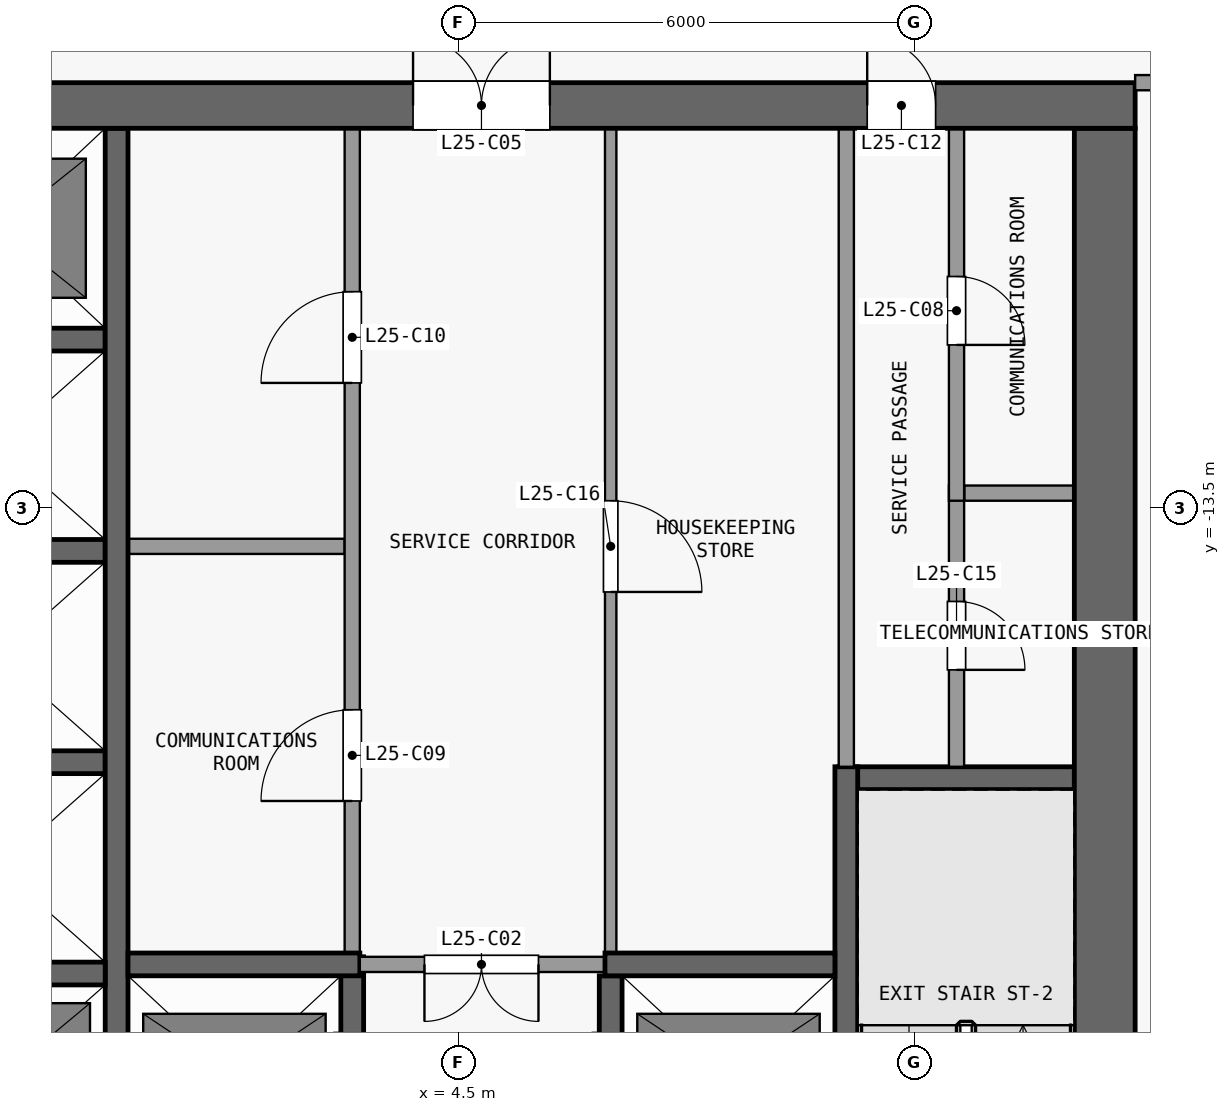
"""IFC4 building model, lengths in metres.
Left out: names, types, materials, properties, quantities, classifications, styles, units other than length and angle.
Written with IfcOpenShell. Run it as: python <this file> out.ifc"""

import sys

from ifc_helpers import new_model, si_unit, direction, frame, frame_2d, origin, place, context, subcontext, project, spatial, rectangle, extrude, element, fill, save


model = new_model("IFC4")
c1 = context("Model", 3, precision=1e-05, world=origin(), true_north=direction((0.0, 1.0)))
c2 = subcontext(c1, "Body", "Model", "MODEL_VIEW")
j1 = project(units=[si_unit("LENGTHUNIT", "METRE"), si_unit("PLANEANGLEUNIT", "RADIAN")], contexts=[c1])
p1 = place(None, origin())
s1 = spatial("IfcSite", under=j1, at=p1, CompositionType="ELEMENT")
p2 = place(p1, origin())
s2 = spatial("IfcBuilding", under=s1, at=p2, CompositionType="ELEMENT")
p3 = place(p2, frame((0.0, 0.0, 102.7)))
s3 = spatial("IfcBuildingStorey", under=s2, at=p3, CompositionType="ELEMENT", Elevation=102.7)
p4 = place(p3, frame((-13.4, -8.2, 0.0), z_axis=(0.0, 0.0, 1.0), x_axis=(1.0, 0.0, 0.0)))
e1 = element("IfcWall", 1, at=p4, inside=s3, PredefinedType="SHEAR", context=c2, shape_type="SweptSolid", body=[
    extrude(rectangle(XDim=26.8, YDim=0.6, at=frame_2d((13.4, 0.0))), origin(), (0.0, 0.0, 1.0), 3.3),
])
p5 = place(p4, frame((7.7, 0.0, 0.0)))
e2 = element("IfcOpeningElement", 2, at=p5, cuts=e1, PredefinedType="OPENING", context=c2, shape_type="SweptSolid", body=[
    extrude(rectangle(XDim=1.8, YDim=2.1, at=frame_2d((0.9, 1.05))), frame((0.0, 0.31, 0.0), z_axis=(0.0, -1.0, 0.0), x_axis=(1.0, 0.0, 0.0)), (0.0, 0.0, 1.0), 0.62),
])
p6 = place(p4, frame((17.3, 0.0, 0.0)))
e3 = element("IfcOpeningElement", 3, at=p6, cuts=e1, PredefinedType="OPENING", context=c2, shape_type="SweptSolid", body=[
    extrude(rectangle(XDim=1.8, YDim=2.1, at=frame_2d((0.9, 1.05))), frame((0.0, 0.31, 0.0), z_axis=(0.0, -1.0, 0.0), x_axis=(1.0, 0.0, 0.0)), (0.0, 0.0, 1.0), 0.62),
])
p7 = place(p4, frame((2.625, 0.0, 0.0)))
e4 = element("IfcOpeningElement", 4, at=p7, cuts=e1, PredefinedType="OPENING", context=c2, shape_type="SweptSolid", body=[
    extrude(rectangle(XDim=0.9, YDim=2.1, at=frame_2d((0.45, 1.05))), frame((0.0, 0.31, 0.0), z_axis=(0.0, -1.0, 0.0), x_axis=(1.0, 0.0, 0.0)), (0.0, 0.0, 1.0), 0.62),
])
p8 = place(p4, frame((23.275, 0.0, 0.0)))
e5 = element("IfcOpeningElement", 5, at=p8, cuts=e1, PredefinedType="OPENING", context=c2, shape_type="SweptSolid", body=[
    extrude(rectangle(XDim=0.9, YDim=2.1, at=frame_2d((0.45, 1.05))), frame((0.0, 0.31, 0.0), z_axis=(0.0, -1.0, 0.0), x_axis=(1.0, 0.0, 0.0)), (0.0, 0.0, 1.0), 0.62),
])
p9 = place(p3, frame((13.0, -24.6, 0.0), z_axis=(0.0, 0.0, 1.0), x_axis=(0.0, 1.0, 0.0)))
e6 = element("IfcWall", 6, at=p9, inside=s3, PredefinedType="SHEAR", context=c2, shape_type="SweptSolid", body=[
    extrude(rectangle(XDim=16.1, YDim=0.8, at=frame_2d((8.05, 0.0))), origin(), (0.0, 0.0, 1.0), 3.3),
])
p10 = place(p3, frame((-2.95, -19.62, 0.0), z_axis=(0.0, 0.0, 1.0), x_axis=(1.0, 0.0, 0.0)))
e7 = element("IfcWall", 7, at=p10, inside=s3, PredefinedType="SHEAR", context=c2, shape_type="SweptSolid", body=[
    extrude(rectangle(XDim=2.8, YDim=0.3, at=frame_2d((1.4, 0.0))), origin(), (0.0, 0.0, 1.0), 3.3),
])
p11 = place(p3, frame((0.15, -19.5, 0.0), z_axis=(0.0, 0.0, 1.0), x_axis=(1.0, 0.0, 0.0)))
e8 = element("IfcWall", 8, at=p11, inside=s3, PredefinedType="SHEAR", context=c2, shape_type="SweptSolid", body=[
    extrude(rectangle(XDim=3.05, YDim=0.3, at=frame_2d((1.525, 0.0))), origin(), (0.0, 0.0, 1.0), 3.3),
])
p12 = place(p3, frame((6.575, -19.5, 0.0), z_axis=(0.0, 0.0, 1.0), x_axis=(-1.0, 0.0, 0.0)))
e9 = element("IfcWall", 9, at=p12, inside=s3, PredefinedType="PARTITIONING", context=c2, shape_type="SweptSolid", body=[
    extrude(rectangle(XDim=3.375, YDim=0.2, at=frame_2d((1.688, 0.0))), origin(), (0.0, 0.0, 1.0), 3.3),
])
p13 = place(p12, frame((1.025, 0.0, 0.0)))
e10 = element("IfcOpeningElement", 10, at=p13, cuts=e9, PredefinedType="OPENING", context=c2, shape_type="SweptSolid", body=[
    extrude(rectangle(XDim=1.5, YDim=2.1, at=frame_2d((0.75, 1.05))), frame((0.0, 0.11, 0.0), z_axis=(0.0, -1.0, 0.0), x_axis=(1.0, 0.0, 0.0)), (0.0, 0.0, 1.0), 0.22),
])
p14 = place(p3, frame((6.425, -19.5, 0.0), z_axis=(0.0, 0.0, 1.0), x_axis=(1.0, 0.0, 0.0)))
e11 = element("IfcWall", 11, at=p14, inside=s3, PredefinedType="SHEAR", context=c2, shape_type="SweptSolid", body=[
    extrude(rectangle(XDim=3.025, YDim=0.3, at=frame_2d((1.512, 0.0))), origin(), (0.0, 0.0, 1.0), 3.3),
])
p15 = place(p3, frame((9.5, -17.05, 0.0), z_axis=(0.0, 0.0, 1.0), x_axis=(1.0, 0.0, 0.0)))
e12 = element("IfcWall", 12, at=p15, inside=s3, PredefinedType="SHEAR", context=c2, shape_type="SweptSolid", body=[
    extrude(rectangle(XDim=3.1, YDim=0.3, at=frame_2d((1.55, 0.0))), origin(), (0.0, 0.0, 1.0), 3.3),
])
for number, where, z_axis, x_axis in (
    (13, (-2.95, -16.84, 0.0), (0.0, 0.0, 1.0), (1.0, 0.0, 0.0)),
    (14, (-2.95, -14.06, 0.0), (0.0, 0.0, 1.0), (1.0, 0.0, 0.0)),
):
    element("IfcWall", number, at=place(p3, frame(where, z_axis=z_axis, x_axis=x_axis)), inside=s3, PredefinedType="SHEAR", context=c2, shape_type="SweptSolid", body=[
        extrude(rectangle(XDim=2.8, YDim=0.3, at=frame_2d((1.4, 0.0))), origin(), (0.0, 0.0, 1.0), 3.3),
    ])
p16 = place(p3, frame((0.15, -14.0, 0.0), z_axis=(0.0, 0.0, 1.0), x_axis=(1.0, 0.0, 0.0)))
e15 = element("IfcWall", 15, at=p16, inside=s3, PredefinedType="PARTITIONING", context=c2, shape_type="SweptSolid", body=[
    extrude(rectangle(XDim=2.85, YDim=0.2, at=frame_2d((1.425, 0.0))), origin(), (0.0, 0.0, 1.0), 3.3),
])
p17 = place(p3, frame((11.15, -13.3, 0.0), z_axis=(0.0, 0.0, 1.0), x_axis=(1.0, 0.0, 0.0)))
e16 = element("IfcWall", 16, at=p17, inside=s3, PredefinedType="PARTITIONING", context=c2, shape_type="SweptSolid", body=[
    extrude(rectangle(XDim=1.45, YDim=0.2, at=frame_2d((0.725, 0.0))), origin(), (0.0, 0.0, 1.0), 3.3),
])
p18 = place(p3, frame((-2.95, -11.28, 0.0), z_axis=(0.0, 0.0, 1.0), x_axis=(1.0, 0.0, 0.0)))
e17 = element("IfcWall", 17, at=p18, inside=s3, PredefinedType="SHEAR", context=c2, shape_type="SweptSolid", body=[
    extrude(rectangle(XDim=2.8, YDim=0.3, at=frame_2d((1.4, 0.0))), origin(), (0.0, 0.0, 1.0), 3.3),
])
p19 = place(p3, frame((0.0, -22.25, 0.0), z_axis=(0.0, 0.0, 1.0), x_axis=(0.0, 1.0, 0.0)))
e18 = element("IfcWall", 18, at=p19, inside=s3, PredefinedType="SHEAR", context=c2, shape_type="SweptSolid", body=[
    extrude(rectangle(XDim=13.75, YDim=0.3, at=frame_2d((6.875, 0.0))), origin(), (0.0, 0.0, 1.0), 3.3),
])
p20 = place(p3, frame((3.1, -22.25, 0.0), z_axis=(0.0, 0.0, 1.0), x_axis=(0.0, 1.0, 0.0)))
e19 = element("IfcWall", 19, at=p20, inside=s3, PredefinedType="SHEAR", context=c2, shape_type="SweptSolid", body=[
    extrude(rectangle(XDim=2.85, YDim=0.3, at=frame_2d((1.425, 0.0))), origin(), (0.0, 0.0, 1.0), 3.3),
])
p21 = place(p20, frame((0.75, 0.0, 0.0)))
e20 = element("IfcOpeningElement", 20, at=p21, cuts=e19, PredefinedType="OPENING", context=c2, shape_type="SweptSolid", body=[
    extrude(rectangle(XDim=1.1, YDim=2.1, at=frame_2d((0.55, 1.05))), frame((0.0, 0.16, 0.0), z_axis=(0.0, -1.0, 0.0), x_axis=(1.0, 0.0, 0.0)), (0.0, 0.0, 1.0), 0.32),
])
p22 = place(p3, frame((3.1, -19.6, 0.0), z_axis=(0.0, 0.0, 1.0), x_axis=(0.0, 1.0, 0.0)))
e21 = element("IfcWall", 21, at=p22, inside=s3, PredefinedType="PARTITIONING", context=c2, shape_type="SweptSolid", body=[
    extrude(rectangle(XDim=11.1, YDim=0.2, at=frame_2d((5.55, 0.0))), origin(), (0.0, 0.0, 1.0), 3.3),
])
p23 = place(p22, frame((2.25, 0.0, 0.0)))
e22 = element("IfcOpeningElement", 22, at=p23, cuts=e21, PredefinedType="OPENING", context=c2, shape_type="SweptSolid", body=[
    extrude(rectangle(XDim=1.2, YDim=2.1, at=frame_2d((0.6, 1.05))), frame((0.0, 0.11, 0.0), z_axis=(0.0, -1.0, 0.0), x_axis=(1.0, 0.0, 0.0)), (0.0, 0.0, 1.0), 0.22),
])
p24 = place(p22, frame((7.75, 0.0, 0.0)))
e23 = element("IfcOpeningElement", 23, at=p24, cuts=e21, PredefinedType="OPENING", context=c2, shape_type="SweptSolid", body=[
    extrude(rectangle(XDim=1.2, YDim=2.1, at=frame_2d((0.6, 1.05))), frame((0.0, 0.11, 0.0), z_axis=(0.0, -1.0, 0.0), x_axis=(1.0, 0.0, 0.0)), (0.0, 0.0, 1.0), 0.22),
])
p25 = place(p3, frame((6.5, -22.25, 0.0), z_axis=(0.0, 0.0, 1.0), x_axis=(0.0, 1.0, 0.0)))
e24 = element("IfcWall", 24, at=p25, inside=s3, PredefinedType="SHEAR", context=c2, shape_type="SweptSolid", body=[
    extrude(rectangle(XDim=2.6, YDim=0.3, at=frame_2d((1.3, 0.0))), origin(), (0.0, 0.0, 1.0), 3.3),
])
p26 = place(p25, frame((0.75, 0.0, 0.0)))
e25 = element("IfcOpeningElement", 25, at=p26, cuts=e24, PredefinedType="OPENING", context=c2, shape_type="SweptSolid", body=[
    extrude(rectangle(XDim=1.1, YDim=2.1, at=frame_2d((0.55, 1.05))), frame((0.0, 0.16, 0.0), z_axis=(0.0, -1.0, 0.0), x_axis=(1.0, 0.0, 0.0)), (0.0, 0.0, 1.0), 0.32),
])
p27 = place(p3, frame((6.5, -8.5, 0.0), z_axis=(0.0, 0.0, 1.0), x_axis=(0.0, -1.0, 0.0)))
e26 = element("IfcWall", 26, at=p27, inside=s3, PredefinedType="PARTITIONING", context=c2, shape_type="SweptSolid", body=[
    extrude(rectangle(XDim=10.85, YDim=0.15, at=frame_2d((5.425, 0.0))), origin(), (0.0, 0.0, 1.0), 3.3),
])
p28 = place(p27, frame((4.9, 0.0, 0.0)))
e27 = element("IfcOpeningElement", 27, at=p28, cuts=e26, PredefinedType="OPENING", context=c2, shape_type="SweptSolid", body=[
    extrude(rectangle(XDim=1.2, YDim=2.1, at=frame_2d((0.6, 1.05))), frame((0.0, 0.085, 0.0), z_axis=(0.0, -1.0, 0.0), x_axis=(1.0, 0.0, 0.0)), (0.0, 0.0, 1.0), 0.17),
])
p29 = place(p3, frame((9.6, -16.9, 0.0), z_axis=(0.0, 0.0, 1.0), x_axis=(0.0, -1.0, 0.0)))
e28 = element("IfcWall", 28, at=p29, inside=s3, PredefinedType="SHEAR", context=c2, shape_type="SweptSolid", body=[
    extrude(rectangle(XDim=7.7, YDim=0.3, at=frame_2d((3.85, 0.0))), origin(), (0.0, 0.0, 1.0), 3.3),
])
p30 = place(p29, frame((6.5, 0.0, 0.0)))
e29 = element("IfcOpeningElement", 29, at=p30, cuts=e28, PredefinedType="OPENING", context=c2, shape_type="SweptSolid", body=[
    extrude(rectangle(XDim=1.1, YDim=2.1, at=frame_2d((0.55, 1.05))), frame((0.0, 0.16, 0.0), z_axis=(0.0, -1.0, 0.0), x_axis=(1.0, 0.0, 0.0)), (0.0, 0.0, 1.0), 0.32),
])
p31 = place(p3, frame((9.6, -16.9, 0.0), z_axis=(0.0, 0.0, 1.0), x_axis=(0.0, 1.0, 0.0)))
e30 = element("IfcWall", 30, at=p31, inside=s3, PredefinedType="PARTITIONING", context=c2, shape_type="SweptSolid", body=[
    extrude(rectangle(XDim=8.4, YDim=0.2, at=frame_2d((4.2, 0.0))), origin(), (0.0, 0.0, 1.0), 3.3),
])
p32 = place(p3, frame((11.05, -13.2, 0.0), z_axis=(0.0, 0.0, 1.0), x_axis=(0.0, -1.0, 0.0)))
e31 = element("IfcWall", 31, at=p32, inside=s3, PredefinedType="PARTITIONING", context=c2, shape_type="SweptSolid", body=[
    extrude(rectangle(XDim=3.7, YDim=0.2, at=frame_2d((1.85, 0.0))), origin(), (0.0, 0.0, 1.0), 3.3),
])
p33 = place(p32, frame((1.525, 0.0, 0.0)))
e32 = element("IfcOpeningElement", 32, at=p33, cuts=e31, PredefinedType="OPENING", context=c2, shape_type="SweptSolid", body=[
    extrude(rectangle(XDim=0.9, YDim=2.1, at=frame_2d((0.45, 1.05))), frame((0.0, 0.11, 0.0), z_axis=(0.0, -1.0, 0.0), x_axis=(1.0, 0.0, 0.0)), (0.0, 0.0, 1.0), 0.22),
])
p34 = place(p3, frame((11.05, -8.5, 0.0), z_axis=(0.0, 0.0, 1.0), x_axis=(0.0, -1.0, 0.0)))
e33 = element("IfcWall", 33, at=p34, inside=s3, PredefinedType="PARTITIONING", context=c2, shape_type="SweptSolid", body=[
    extrude(rectangle(XDim=4.9, YDim=0.2, at=frame_2d((2.45, 0.0))), origin(), (0.0, 0.0, 1.0), 3.3),
])
p35 = place(p34, frame((1.95, 0.0, 0.0)))
e34 = element("IfcOpeningElement", 34, at=p35, cuts=e33, PredefinedType="OPENING", context=c2, shape_type="SweptSolid", body=[
    extrude(rectangle(XDim=0.9, YDim=2.1, at=frame_2d((0.45, 1.05))), frame((0.0, 0.11, 0.0), z_axis=(0.0, -1.0, 0.0), x_axis=(1.0, 0.0, 0.0)), (0.0, 0.0, 1.0), 0.22),
])
p36 = place(p3, frame((13.4, -7.9, 0.0), z_axis=(0.0, 0.0, 1.0), x_axis=(1.0, 0.0, 0.0)))
e35 = element("IfcWall", 35, at=p36, inside=s3, PredefinedType="PARTITIONING", context=c2, shape_type="SweptSolid", body=[
    extrude(rectangle(XDim=10.45, YDim=0.2, at=frame_2d((5.225, 0.0))), origin(), (0.0, 0.0, 1.0), 3.3),
])
p37 = place(p36, frame((1.0, 0.0, 0.0)))
e36 = element("IfcOpeningElement", 36, at=p37, cuts=e35, PredefinedType="OPENING", context=c2, shape_type="SweptSolid", body=[
    extrude(rectangle(XDim=1.0, YDim=2.1, at=frame_2d((0.5, 1.05))), frame((0.0, 0.11, 0.0), z_axis=(0.0, -1.0, 0.0), x_axis=(1.0, 0.0, 0.0)), (0.0, 0.0, 1.0), 0.22),
])
p38 = place(p13, origin())
e37 = element("IfcDoor", 37, at=p38, inside=s3, OperationType="DOUBLE_DOOR_SINGLE_SWING", PredefinedType="DOOR", context=c2, shape_type="SweptSolid", body=[
    extrude(rectangle(XDim=1.5, YDim=2.1, at=frame_2d((0.75, 1.05))), frame((0.0, 0.025, 0.0), z_axis=(0.0, -1.0, 0.0), x_axis=(1.0, 0.0, 0.0)), (0.0, 0.0, 1.0), 0.05),
])
fill(e10, e37)
p39 = place(p6, origin())
e38 = element("IfcDoor", 38, at=p39, inside=s3, OperationType="DOUBLE_DOOR_SINGLE_SWING", PredefinedType="DOOR", context=c2, shape_type="SweptSolid", body=[
    extrude(rectangle(XDim=1.8, YDim=2.1, at=frame_2d((0.9, 1.05))), frame((0.0, 0.025, 0.0), z_axis=(0.0, -1.0, 0.0), x_axis=(1.0, 0.0, 0.0)), (0.0, 0.0, 1.0), 0.05),
])
fill(e3, e38)
p40 = place(p35, origin())
e39 = element("IfcDoor", 39, at=p40, inside=s3, OperationType="SINGLE_SWING_RIGHT", PredefinedType="DOOR", context=c2, shape_type="SweptSolid", body=[
    extrude(rectangle(XDim=0.9, YDim=2.1, at=frame_2d((0.45, 1.05))), frame((0.0, 0.025, 0.0), z_axis=(0.0, -1.0, 0.0), x_axis=(1.0, 0.0, 0.0)), (0.0, 0.0, 1.0), 0.05),
])
fill(e34, e39)
p41 = place(p23, origin())
e40 = element("IfcDoor", 40, at=p41, inside=s3, OperationType="SINGLE_SWING_LEFT", PredefinedType="DOOR", context=c2, shape_type="SweptSolid", body=[
    extrude(rectangle(XDim=1.2, YDim=2.1, at=frame_2d((0.6, 1.05))), frame((0.0, 0.025, 0.0), z_axis=(0.0, -1.0, 0.0), x_axis=(1.0, 0.0, 0.0)), (0.0, 0.0, 1.0), 0.05),
])
fill(e22, e40)
p42 = place(p24, origin())
e41 = element("IfcDoor", 41, at=p42, inside=s3, OperationType="SINGLE_SWING_LEFT", PredefinedType="DOOR", context=c2, shape_type="SweptSolid", body=[
    extrude(rectangle(XDim=1.2, YDim=2.1, at=frame_2d((0.6, 1.05))), frame((0.0, 0.025, 0.0), z_axis=(0.0, -1.0, 0.0), x_axis=(1.0, 0.0, 0.0)), (0.0, 0.0, 1.0), 0.05),
])
fill(e23, e41)
p43 = place(p8, origin())
e42 = element("IfcDoor", 42, at=p43, inside=s3, OperationType="SINGLE_SWING_LEFT", PredefinedType="DOOR", context=c2, shape_type="SweptSolid", body=[
    extrude(rectangle(XDim=0.9, YDim=2.1, at=frame_2d((0.45, 1.05))), frame((0.0, 0.025, 0.0), z_axis=(0.0, -1.0, 0.0), x_axis=(1.0, 0.0, 0.0)), (0.0, 0.0, 1.0), 0.05),
])
fill(e5, e42)
p44 = place(p33, origin())
e43 = element("IfcDoor", 43, at=p44, inside=s3, OperationType="SINGLE_SWING_RIGHT", PredefinedType="DOOR", context=c2, shape_type="SweptSolid", body=[
    extrude(rectangle(XDim=0.9, YDim=2.1, at=frame_2d((0.45, 1.05))), frame((0.0, 0.025, 0.0), z_axis=(0.0, -1.0, 0.0), x_axis=(1.0, 0.0, 0.0)), (0.0, 0.0, 1.0), 0.05),
])
fill(e32, e43)
p45 = place(p28, origin())
e44 = element("IfcDoor", 44, at=p45, inside=s3, OperationType="SINGLE_SWING_RIGHT", PredefinedType="DOOR", context=c2, shape_type="SweptSolid", body=[
    extrude(rectangle(XDim=1.2, YDim=2.1, at=frame_2d((0.6, 1.05))), frame((0.0, 0.025, 0.0), z_axis=(0.0, -1.0, 0.0), x_axis=(1.0, 0.0, 0.0)), (0.0, 0.0, 1.0), 0.05),
])
fill(e27, e44)
save(model, sys.argv[1])
